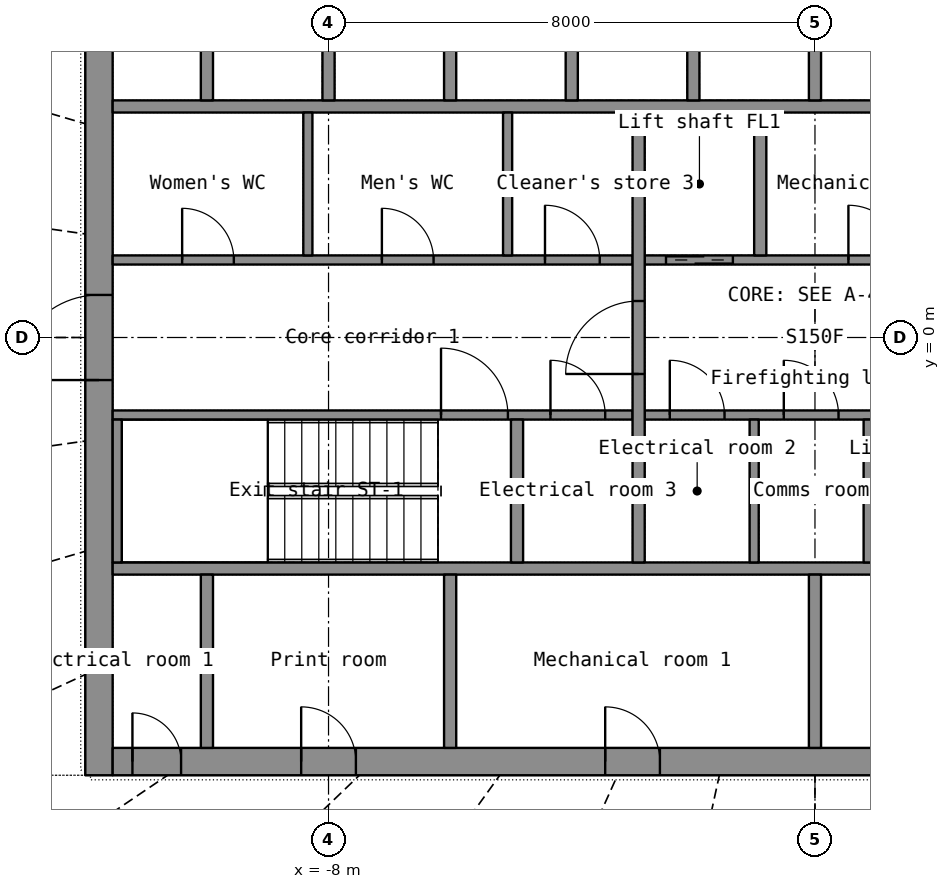
"""IFC4 building model, lengths in metres.
Left out: names, types, materials, properties, quantities, classifications, styles, units other than length and angle.
Written with IfcOpenShell. Run it as: python <this file> out.ifc"""

import sys

from ifc_helpers import new_model, si_unit, direction, frame, frame_2d, origin, place, context, subcontext, project, spatial, rectangle, extrude, element, fill, save


model = new_model("IFC4")
c1 = context("Model", 3, precision=1e-05, world=origin(), true_north=direction((0.0, 1.0)))
c2 = subcontext(c1, "Body", "Model", "MODEL_VIEW")
j1 = project(units=[si_unit("LENGTHUNIT", "METRE"), si_unit("PLANEANGLEUNIT", "RADIAN")], contexts=[c1])
p1 = place(None, origin())
s1 = spatial("IfcSite", under=j1, at=p1, CompositionType="ELEMENT")
p2 = place(p1, origin())
s2 = spatial("IfcBuilding", under=s1, at=p2, CompositionType="ELEMENT")
p3 = place(p2, frame((0.0, 0.0, 190.4)))
s3 = spatial("IfcBuildingStorey", under=s2, at=p3, CompositionType="ELEMENT", Elevation=190.4)
p4 = place(p3, frame((-11.775, -7.2, 0.0), z_axis=(0.0, 0.0, 1.0), x_axis=(0.0, 1.0, 0.0)))
e1 = element("IfcWall", 1, at=p4, inside=s3, PredefinedType="SHEAR", context=c2, shape_type="SweptSolid", body=[
    extrude(rectangle(XDim=14.4, YDim=0.45, at=frame_2d((7.2, 0.0))), origin(), (0.0, 0.0, 1.0), 3.3),
])
p5 = place(p4, frame((6.5, 0.0, 0.0)))
e2 = element("IfcOpeningElement", 2, at=p5, cuts=e1, PredefinedType="OPENING", context=c2, shape_type="SweptSolid", body=[
    extrude(rectangle(XDim=1.4, YDim=2.2, at=frame_2d((0.7, 1.1))), frame((0.0, 0.235, 0.0), z_axis=(0.0, -1.0, 0.0), x_axis=(1.0, 0.0, 0.0)), (0.0, 0.0, 1.0), 0.47),
])
p6 = place(p3, frame((-11.55, -6.975, 0.0), z_axis=(0.0, 0.0, 1.0), x_axis=(1.0, 0.0, 0.0)))
e3 = element("IfcWall", 3, at=p6, inside=s3, PredefinedType="SHEAR", context=c2, shape_type="SweptSolid", body=[
    extrude(rectangle(XDim=23.1, YDim=0.45, at=frame_2d((11.55, 0.0))), origin(), (0.0, 0.0, 1.0), 3.3),
])
p7 = place(p6, frame((20.0, 0.0, 0.0)))
e4 = element("IfcOpeningElement", 4, at=p7, cuts=e3, PredefinedType="OPENING", context=c2, shape_type="SweptSolid", body=[
    extrude(rectangle(XDim=1.1, YDim=2.2, at=frame_2d((0.55, 1.1))), frame((0.0, 0.235, 0.0), z_axis=(0.0, -1.0, 0.0), x_axis=(1.0, 0.0, 0.0)), (0.0, 0.0, 1.0), 0.47),
])
p8 = place(p6, frame((3.1, 0.0, 0.0)))
e5 = element("IfcOpeningElement", 5, at=p8, cuts=e3, PredefinedType="OPENING", context=c2, shape_type="SweptSolid", body=[
    extrude(rectangle(XDim=0.9, YDim=2.1, at=frame_2d((0.45, 1.05))), frame((0.0, 0.235, 0.0), z_axis=(0.0, -1.0, 0.0), x_axis=(1.0, 0.0, 0.0)), (0.0, 0.0, 1.0), 0.47),
])
p9 = place(p6, frame((8.1, 0.0, 0.0)))
e6 = element("IfcOpeningElement", 6, at=p9, cuts=e3, PredefinedType="OPENING", context=c2, shape_type="SweptSolid", body=[
    extrude(rectangle(XDim=0.9, YDim=2.1, at=frame_2d((0.45, 1.05))), frame((0.0, 0.235, 0.0), z_axis=(0.0, -1.0, 0.0), x_axis=(1.0, 0.0, 0.0)), (0.0, 0.0, 1.0), 0.47),
])
p10 = place(p6, frame((15.1, 0.0, 0.0)))
e7 = element("IfcOpeningElement", 7, at=p10, cuts=e3, PredefinedType="OPENING", context=c2, shape_type="SweptSolid", body=[
    extrude(rectangle(XDim=0.9, YDim=2.1, at=frame_2d((0.45, 1.05))), frame((0.0, 0.235, 0.0), z_axis=(0.0, -1.0, 0.0), x_axis=(1.0, 0.0, 0.0)), (0.0, 0.0, 1.0), 0.47),
])
p11 = place(p6, frame((0.325, 0.0, 0.0)))
e8 = element("IfcOpeningElement", 8, at=p11, cuts=e3, PredefinedType="OPENING", context=c2, shape_type="SweptSolid", body=[
    extrude(rectangle(XDim=0.8, YDim=2.05, at=frame_2d((0.4, 1.025))), frame((0.0, 0.235, 0.0), z_axis=(0.0, -1.0, 0.0), x_axis=(1.0, 0.0, 0.0)), (0.0, 0.0, 1.0), 0.47),
])
p12 = place(p6, frame((21.975, 0.0, 0.0)))
e9 = element("IfcOpeningElement", 9, at=p12, cuts=e3, PredefinedType="OPENING", context=c2, shape_type="SweptSolid", body=[
    extrude(rectangle(XDim=0.8, YDim=2.05, at=frame_2d((0.4, 1.025))), frame((0.0, 0.235, 0.0), z_axis=(0.0, -1.0, 0.0), x_axis=(1.0, 0.0, 0.0)), (0.0, 0.0, 1.0), 0.47),
])
for number, where, z_axis, x_axis in (
    (10, (-11.55, -3.8, 0.0), (0.0, 0.0, 1.0), (1.0, 0.0, 0.0)),
    (11, (-11.55, 3.8, 0.0), (0.0, 0.0, 1.0), (1.0, 0.0, 0.0)),
):
    element("IfcWall", number, at=place(p3, frame(where, z_axis=z_axis, x_axis=x_axis)), inside=s3, PredefinedType="SHEAR", context=c2, shape_type="SweptSolid", body=[
        extrude(rectangle(XDim=23.1, YDim=0.2, at=frame_2d((11.55, 0.0))), origin(), (0.0, 0.0, 1.0), 3.3),
    ])
p13 = place(p3, frame((-10.0, -6.75, 0.0), z_axis=(0.0, 0.0, 1.0), x_axis=(0.0, 1.0, 0.0)))
e12 = element("IfcWall", 12, at=p13, inside=s3, PredefinedType="SHEAR", context=c2, shape_type="SweptSolid", body=[
    extrude(rectangle(XDim=2.85, YDim=0.2, at=frame_2d((1.425, 0.0))), origin(), (0.0, 0.0, 1.0), 3.3),
])
for number, where, z_axis, x_axis in (
    (13, (-6.0, -6.75, 0.0), (0.0, 0.0, 1.0), (0.0, 1.0, 0.0)),
    (14, (0.0, -6.75, 0.0), (0.0, 0.0, 1.0), (0.0, 1.0, 0.0)),
):
    element("IfcWall", number, at=place(p3, frame(where, z_axis=z_axis, x_axis=x_axis)), inside=s3, PredefinedType="PARTITIONING", context=c2, shape_type="SweptSolid", body=[
        extrude(rectangle(XDim=2.85, YDim=0.2, at=frame_2d((1.425, 0.0))), origin(), (0.0, 0.0, 1.0), 3.3),
    ])
for number, where, z_axis, x_axis in (
    (15, (-10.0, 3.9, 0.0), (0.0, 0.0, 1.0), (0.0, 1.0, 0.0)),
    (16, (-8.0, 3.9, 0.0), (0.0, 0.0, 1.0), (0.0, 1.0, 0.0)),
    (17, (-6.0, 3.9, 0.0), (0.0, 0.0, 1.0), (0.0, 1.0, 0.0)),
    (18, (-4.0, 3.9, 0.0), (0.0, 0.0, 1.0), (0.0, 1.0, 0.0)),
    (19, (-2.0, 3.9, 0.0), (0.0, 0.0, 1.0), (0.0, 1.0, 0.0)),
    (20, (0.0, 3.9, 0.0), (0.0, 0.0, 1.0), (0.0, 1.0, 0.0)),
):
    element("IfcWall", number, at=place(p3, frame(where, z_axis=z_axis, x_axis=x_axis)), inside=s3, PredefinedType="SHEAR", context=c2, shape_type="SweptSolid", body=[
        extrude(rectangle(XDim=2.85, YDim=0.2, at=frame_2d((1.425, 0.0))), origin(), (0.0, 0.0, 1.0), 3.3),
    ])
p14 = place(p3, frame((-11.55, -1.275, 0.0), z_axis=(0.0, 0.0, 1.0), x_axis=(1.0, 0.0, 0.0)))
e21 = element("IfcWall", 21, at=p14, inside=s3, PredefinedType="SHEAR", context=c2, shape_type="SweptSolid", body=[
    extrude(rectangle(XDim=8.55, YDim=0.15, at=frame_2d((4.275, 0.0))), origin(), (0.0, 0.0, 1.0), 3.3),
])
p15 = place(p14, frame((5.4, 0.0, 0.0)))
e22 = element("IfcOpeningElement", 22, at=p15, cuts=e21, PredefinedType="OPENING", context=c2, shape_type="SweptSolid", body=[
    extrude(rectangle(XDim=1.1, YDim=2.15, at=frame_2d((0.55, 1.075))), frame((0.0, 0.085, 0.0), z_axis=(0.0, -1.0, 0.0), x_axis=(1.0, 0.0, 0.0)), (0.0, 0.0, 1.0), 0.17),
])
p16 = place(p14, frame((7.2, 0.0, 0.0)))
e23 = element("IfcOpeningElement", 23, at=p16, cuts=e21, PredefinedType="OPENING", context=c2, shape_type="SweptSolid", body=[
    extrude(rectangle(XDim=0.9, YDim=2.1, at=frame_2d((0.45, 1.05))), frame((0.0, 0.085, 0.0), z_axis=(0.0, -1.0, 0.0), x_axis=(1.0, 0.0, 0.0)), (0.0, 0.0, 1.0), 0.17),
])
p17 = place(p3, frame((-2.8, -1.275, 0.0), z_axis=(0.0, 0.0, 1.0), x_axis=(1.0, 0.0, 0.0)))
e24 = element("IfcWall", 24, at=p17, inside=s3, PredefinedType="SHEAR", context=c2, shape_type="SweptSolid", body=[
    extrude(rectangle(XDim=5.6, YDim=0.15, at=frame_2d((2.8, 0.0))), origin(), (0.0, 0.0, 1.0), 3.3),
])
p18 = place(p17, frame((4.15, 0.0, 0.0)))
e25 = element("IfcOpeningElement", 25, at=p18, cuts=e24, PredefinedType="OPENING", context=c2, shape_type="SweptSolid", body=[
    extrude(rectangle(XDim=1.1, YDim=2.2, at=frame_2d((0.55, 1.1))), frame((0.0, 0.085, 0.0), z_axis=(0.0, -1.0, 0.0), x_axis=(1.0, 0.0, 0.0)), (0.0, 0.0, 1.0), 0.17),
])
p19 = place(p17, frame((0.413, 0.0, 0.0)))
e26 = element("IfcOpeningElement", 26, at=p19, cuts=e24, PredefinedType="OPENING", context=c2, shape_type="SweptSolid", body=[
    extrude(rectangle(XDim=0.9, YDim=2.1, at=frame_2d((0.45, 1.05))), frame((0.0, 0.085, 0.0), z_axis=(0.0, -1.0, 0.0), x_axis=(1.0, 0.0, 0.0)), (0.0, 0.0, 1.0), 0.17),
])
p20 = place(p17, frame((2.288, 0.0, 0.0)))
e27 = element("IfcOpeningElement", 27, at=p20, cuts=e24, PredefinedType="OPENING", context=c2, shape_type="SweptSolid", body=[
    extrude(rectangle(XDim=0.9, YDim=2.1, at=frame_2d((0.45, 1.05))), frame((0.0, 0.085, 0.0), z_axis=(0.0, -1.0, 0.0), x_axis=(1.0, 0.0, 0.0)), (0.0, 0.0, 1.0), 0.17),
])
p21 = place(p3, frame((-11.55, 1.275, 0.0), z_axis=(0.0, 0.0, 1.0), x_axis=(1.0, 0.0, 0.0)))
e28 = element("IfcWall", 28, at=p21, inside=s3, PredefinedType="PARTITIONING", context=c2, shape_type="SweptSolid", body=[
    extrude(rectangle(XDim=8.55, YDim=0.15, at=frame_2d((4.275, 0.0))), origin(), (0.0, 0.0, 1.0), 3.3),
])
p22 = place(p21, frame((1.143, 0.0, 0.0)))
e29 = element("IfcOpeningElement", 29, at=p22, cuts=e28, PredefinedType="OPENING", context=c2, shape_type="SweptSolid", body=[
    extrude(rectangle(XDim=0.85, YDim=2.1, at=frame_2d((0.425, 1.05))), frame((0.0, 0.085, 0.0), z_axis=(0.0, -1.0, 0.0), x_axis=(1.0, 0.0, 0.0)), (0.0, 0.0, 1.0), 0.17),
])
p23 = place(p21, frame((4.427, 0.0, 0.0)))
e30 = element("IfcOpeningElement", 30, at=p23, cuts=e28, PredefinedType="OPENING", context=c2, shape_type="SweptSolid", body=[
    extrude(rectangle(XDim=0.85, YDim=2.1, at=frame_2d((0.425, 1.05))), frame((0.0, 0.085, 0.0), z_axis=(0.0, -1.0, 0.0), x_axis=(1.0, 0.0, 0.0)), (0.0, 0.0, 1.0), 0.17),
])
p24 = place(p21, frame((7.11, 0.0, 0.0)))
e31 = element("IfcOpeningElement", 31, at=p24, cuts=e28, PredefinedType="OPENING", context=c2, shape_type="SweptSolid", body=[
    extrude(rectangle(XDim=0.9, YDim=2.1, at=frame_2d((0.45, 1.05))), frame((0.0, 0.085, 0.0), z_axis=(0.0, -1.0, 0.0), x_axis=(1.0, 0.0, 0.0)), (0.0, 0.0, 1.0), 0.17),
])
p25 = place(p3, frame((-2.8, 1.275, 0.0), z_axis=(0.0, 0.0, 1.0), x_axis=(1.0, 0.0, 0.0)))
e32 = element("IfcWall", 32, at=p25, inside=s3, PredefinedType="SHEAR", context=c2, shape_type="SweptSolid", body=[
    extrude(rectangle(XDim=5.6, YDim=0.15, at=frame_2d((2.8, 0.0))), origin(), (0.0, 0.0, 1.0), 3.3),
])
p26 = place(p25, frame((0.35, 0.0, 0.0)))
e33 = element("IfcOpeningElement", 33, at=p26, cuts=e32, PredefinedType="OPENING", context=c2, shape_type="SweptSolid", body=[
    extrude(rectangle(XDim=1.1, YDim=2.2, at=frame_2d((0.55, 1.1))), frame((0.0, 0.085, 0.0), z_axis=(0.0, -1.0, 0.0), x_axis=(1.0, 0.0, 0.0)), (0.0, 0.0, 1.0), 0.17),
])
p27 = place(p25, frame((3.35, 0.0, 0.0)))
e34 = element("IfcOpeningElement", 34, at=p27, cuts=e32, PredefinedType="OPENING", context=c2, shape_type="SweptSolid", body=[
    extrude(rectangle(XDim=0.9, YDim=2.1, at=frame_2d((0.45, 1.05))), frame((0.0, 0.085, 0.0), z_axis=(0.0, -1.0, 0.0), x_axis=(1.0, 0.0, 0.0)), (0.0, 0.0, 1.0), 0.17),
])
p28 = place(p3, frame((-2.9, -3.7, 0.0), z_axis=(0.0, 0.0, 1.0), x_axis=(0.0, 1.0, 0.0)))
e35 = element("IfcWall", 35, at=p28, inside=s3, PredefinedType="SHEAR", context=c2, shape_type="SweptSolid", body=[
    extrude(rectangle(XDim=7.4, YDim=0.2, at=frame_2d((3.7, 0.0))), origin(), (0.0, 0.0, 1.0), 3.3),
])
p29 = place(p28, frame((3.1, 0.0, 0.0)))
e36 = element("IfcOpeningElement", 36, at=p29, cuts=e35, PredefinedType="OPENING", context=c2, shape_type="SweptSolid", body=[
    extrude(rectangle(XDim=1.2, YDim=2.2, at=frame_2d((0.6, 1.1))), frame((0.0, 0.11, 0.0), z_axis=(0.0, -1.0, 0.0), x_axis=(1.0, 0.0, 0.0)), (0.0, 0.0, 1.0), 0.22),
])
for number, where, z_axis, x_axis in (
    (37, (-0.9, 1.35, 0.0), (0.0, 0.0, 1.0), (0.0, 1.0, 0.0)),
    (38, (0.9, -3.7, 0.0), (0.0, 0.0, 1.0), (0.0, 1.0, 0.0)),
):
    element("IfcWall", number, at=place(p3, frame(where, z_axis=z_axis, x_axis=x_axis)), inside=s3, PredefinedType="SHEAR", context=c2, shape_type="SweptSolid", body=[
        extrude(rectangle(XDim=2.35, YDim=0.2, at=frame_2d((1.175, 0.0))), origin(), (0.0, 0.0, 1.0), 3.3),
    ])
p30 = place(p3, frame((-11.475, -3.7, 0.0), z_axis=(0.0, 0.0, 1.0), x_axis=(0.0, 1.0, 0.0)))
e39 = element("IfcWall", 39, at=p30, inside=s3, PredefinedType="SHEAR", context=c2, shape_type="SweptSolid", body=[
    extrude(rectangle(XDim=2.35, YDim=0.15, at=frame_2d((1.175, 0.0))), origin(), (0.0, 0.0, 1.0), 3.3),
])
p31 = place(p3, frame((-4.9, -3.7, 0.0), z_axis=(0.0, 0.0, 1.0), x_axis=(0.0, 1.0, 0.0)))
e40 = element("IfcWall", 40, at=p31, inside=s3, PredefinedType="SHEAR", context=c2, shape_type="SweptSolid", body=[
    extrude(rectangle(XDim=2.35, YDim=0.2, at=frame_2d((1.175, 0.0))), origin(), (0.0, 0.0, 1.0), 3.3),
])
for number, where, z_axis, x_axis in (
    (41, (-8.34, 1.35, 0.0), (0.0, 0.0, 1.0), (0.0, 1.0, 0.0)),
    (42, (-5.055, 1.35, 0.0), (0.0, 0.0, 1.0), (0.0, 1.0, 0.0)),
    (43, (-1.0, -3.7, 0.0), (0.0, 0.0, 1.0), (0.0, 1.0, 0.0)),
):
    element("IfcWall", number, at=place(p3, frame(where, z_axis=z_axis, x_axis=x_axis)), inside=s3, PredefinedType="PARTITIONING", context=c2, shape_type="SweptSolid", body=[
        extrude(rectangle(XDim=2.35, YDim=0.15, at=frame_2d((1.175, 0.0))), origin(), (0.0, 0.0, 1.0), 3.3),
    ])
p32 = place(p8, origin())
e44 = element("IfcDoor", 44, at=p32, inside=s3, OperationType="SINGLE_SWING_LEFT", PredefinedType="DOOR", context=c2, shape_type="SweptSolid", body=[
    extrude(rectangle(XDim=0.9, YDim=2.1, at=frame_2d((0.45, 1.05))), frame((0.0, 0.025, 0.0), z_axis=(0.0, -1.0, 0.0), x_axis=(1.0, 0.0, 0.0)), (0.0, 0.0, 1.0), 0.05),
])
fill(e5, e44)
p33 = place(p9, origin())
e45 = element("IfcDoor", 45, at=p33, inside=s3, OperationType="SINGLE_SWING_LEFT", PredefinedType="DOOR", context=c2, shape_type="SweptSolid", body=[
    extrude(rectangle(XDim=0.9, YDim=2.1, at=frame_2d((0.45, 1.05))), frame((0.0, 0.025, 0.0), z_axis=(0.0, -1.0, 0.0), x_axis=(1.0, 0.0, 0.0)), (0.0, 0.0, 1.0), 0.05),
])
fill(e6, e45)
p34 = place(p11, origin())
e46 = element("IfcDoor", 46, at=p34, inside=s3, OperationType="SINGLE_SWING_LEFT", PredefinedType="DOOR", context=c2, shape_type="SweptSolid", body=[
    extrude(rectangle(XDim=0.8, YDim=2.05, at=frame_2d((0.4, 1.025))), frame((0.0, 0.025, 0.0), z_axis=(0.0, -1.0, 0.0), x_axis=(1.0, 0.0, 0.0)), (0.0, 0.0, 1.0), 0.05),
])
fill(e8, e46)
p35 = place(p5, origin())
e47 = element("IfcDoor", 47, at=p35, inside=s3, OperationType="DOUBLE_DOOR_SINGLE_SWING", PredefinedType="DOOR", context=c2, shape_type="SweptSolid", body=[
    extrude(rectangle(XDim=1.4, YDim=2.2, at=frame_2d((0.7, 1.1))), frame((0.0, 0.025, 0.0), z_axis=(0.0, -1.0, 0.0), x_axis=(1.0, 0.0, 0.0)), (0.0, 0.0, 1.0), 0.05),
])
fill(e2, e47)
p36 = place(p29, origin())
e48 = element("IfcDoor", 48, at=p36, inside=s3, OperationType="SINGLE_SWING_LEFT", PredefinedType="DOOR", context=c2, shape_type="SweptSolid", body=[
    extrude(rectangle(XDim=1.2, YDim=2.2, at=frame_2d((0.6, 1.1))), frame((0.0, 0.025, 0.0), z_axis=(0.0, -1.0, 0.0), x_axis=(1.0, 0.0, 0.0)), (0.0, 0.0, 1.0), 0.05),
])
fill(e36, e48)
p37 = place(p26, origin())
e49 = element("IfcDoor", 49, at=p37, inside=s3, OperationType="DOUBLE_DOOR_SLIDING", PredefinedType="DOOR", context=c2, shape_type="SweptSolid", body=[
    extrude(rectangle(XDim=1.1, YDim=2.2, at=frame_2d((0.55, 1.1))), frame((0.0, 0.025, 0.0), z_axis=(0.0, -1.0, 0.0), x_axis=(1.0, 0.0, 0.0)), (0.0, 0.0, 1.0), 0.05),
])
fill(e33, e49)
p38 = place(p15, origin())
e50 = element("IfcDoor", 50, at=p38, inside=s3, OperationType="SINGLE_SWING_LEFT", PredefinedType="DOOR", context=c2, shape_type="SweptSolid", body=[
    extrude(rectangle(XDim=1.1, YDim=2.15, at=frame_2d((0.55, 1.075))), frame((0.0, 0.025, 0.0), z_axis=(0.0, -1.0, 0.0), x_axis=(1.0, 0.0, 0.0)), (0.0, 0.0, 1.0), 0.05),
])
fill(e22, e50)
p39 = place(p22, origin())
e51 = element("IfcDoor", 51, at=p39, inside=s3, OperationType="SINGLE_SWING_LEFT", PredefinedType="DOOR", context=c2, shape_type="SweptSolid", body=[
    extrude(rectangle(XDim=0.85, YDim=2.1, at=frame_2d((0.425, 1.05))), frame((0.0, 0.025, 0.0), z_axis=(0.0, -1.0, 0.0), x_axis=(1.0, 0.0, 0.0)), (0.0, 0.0, 1.0), 0.05),
])
fill(e29, e51)
p40 = place(p23, origin())
e52 = element("IfcDoor", 52, at=p40, inside=s3, OperationType="SINGLE_SWING_LEFT", PredefinedType="DOOR", context=c2, shape_type="SweptSolid", body=[
    extrude(rectangle(XDim=0.85, YDim=2.1, at=frame_2d((0.425, 1.05))), frame((0.0, 0.025, 0.0), z_axis=(0.0, -1.0, 0.0), x_axis=(1.0, 0.0, 0.0)), (0.0, 0.0, 1.0), 0.05),
])
fill(e30, e52)
p41 = place(p24, origin())
e53 = element("IfcDoor", 53, at=p41, inside=s3, OperationType="SINGLE_SWING_LEFT", PredefinedType="DOOR", context=c2, shape_type="SweptSolid", body=[
    extrude(rectangle(XDim=0.9, YDim=2.1, at=frame_2d((0.45, 1.05))), frame((0.0, 0.025, 0.0), z_axis=(0.0, -1.0, 0.0), x_axis=(1.0, 0.0, 0.0)), (0.0, 0.0, 1.0), 0.05),
])
fill(e31, e53)
p42 = place(p27, origin())
e54 = element("IfcDoor", 54, at=p42, inside=s3, OperationType="SINGLE_SWING_LEFT", PredefinedType="DOOR", context=c2, shape_type="SweptSolid", body=[
    extrude(rectangle(XDim=0.9, YDim=2.1, at=frame_2d((0.45, 1.05))), frame((0.0, 0.025, 0.0), z_axis=(0.0, -1.0, 0.0), x_axis=(1.0, 0.0, 0.0)), (0.0, 0.0, 1.0), 0.05),
])
fill(e34, e54)
p43 = place(p19, origin())
e55 = element("IfcDoor", 55, at=p43, inside=s3, OperationType="SINGLE_SWING_LEFT", PredefinedType="DOOR", context=c2, shape_type="SweptSolid", body=[
    extrude(rectangle(XDim=0.9, YDim=2.1, at=frame_2d((0.45, 1.05))), frame((0.0, 0.025, 0.0), z_axis=(0.0, -1.0, 0.0), x_axis=(1.0, 0.0, 0.0)), (0.0, 0.0, 1.0), 0.05),
])
fill(e26, e55)
p44 = place(p20, origin())
e56 = element("IfcDoor", 56, at=p44, inside=s3, OperationType="SINGLE_SWING_LEFT", PredefinedType="DOOR", context=c2, shape_type="SweptSolid", body=[
    extrude(rectangle(XDim=0.9, YDim=2.1, at=frame_2d((0.45, 1.05))), frame((0.0, 0.025, 0.0), z_axis=(0.0, -1.0, 0.0), x_axis=(1.0, 0.0, 0.0)), (0.0, 0.0, 1.0), 0.05),
])
fill(e27, e56)
p45 = place(p16, origin())
e57 = element("IfcDoor", 57, at=p45, inside=s3, OperationType="SINGLE_SWING_LEFT", PredefinedType="DOOR", context=c2, shape_type="SweptSolid", body=[
    extrude(rectangle(XDim=0.9, YDim=2.1, at=frame_2d((0.45, 1.05))), frame((0.0, 0.025, 0.0), z_axis=(0.0, -1.0, 0.0), x_axis=(1.0, 0.0, 0.0)), (0.0, 0.0, 1.0), 0.05),
])
fill(e23, e57)
save(model, sys.argv[1])
